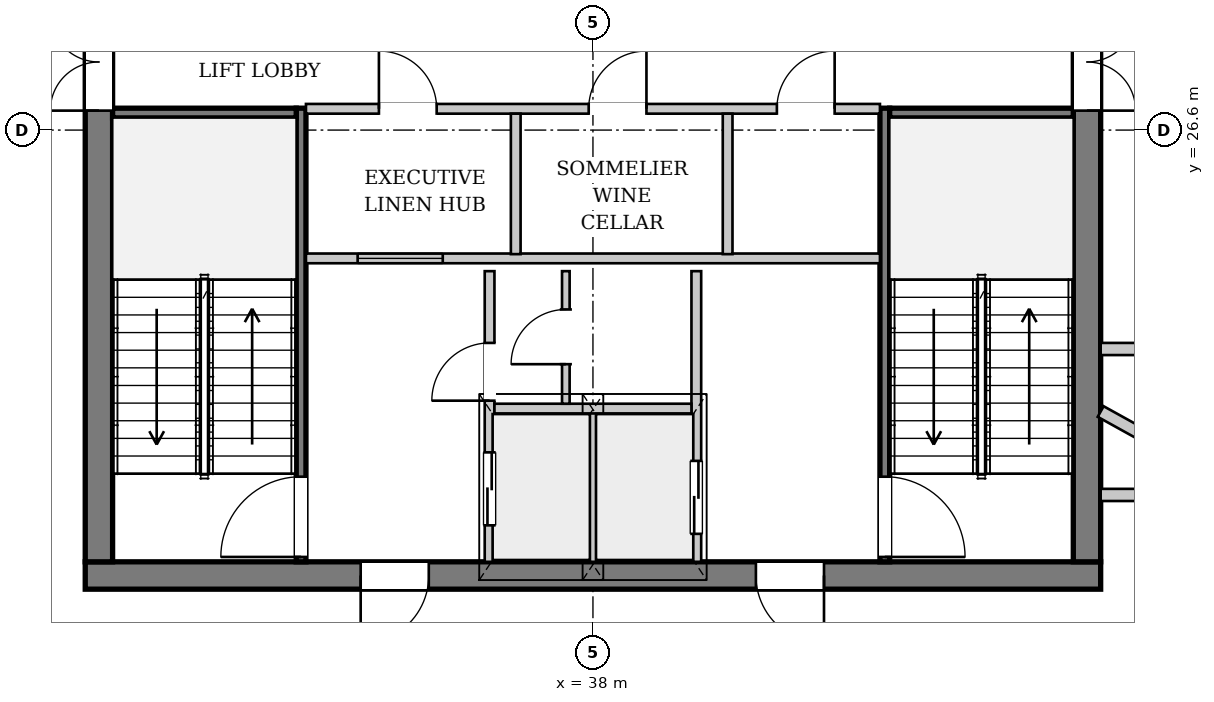
"""IFC4 building model, lengths in metres.
Left out: names, types, materials, properties, quantities, classifications, styles, units other than length and angle.
Written with IfcOpenShell. Run it as: python <this file> out.ifc"""

import sys

from ifc_helpers import new_model, si_unit, direction, frame, frame_2d, origin, place, context, subcontext, project, spatial, rectangle, extrude, source, transform, mapped, element, fill, save


model = new_model("IFC4")
c1 = context("Model", 3, precision=1e-05, world=origin(), true_north=direction((0.0, 1.0)))
c2 = subcontext(c1, "Body", "Model", "MODEL_VIEW")
j1 = project(units=[si_unit("LENGTHUNIT", "METRE"), si_unit("PLANEANGLEUNIT", "RADIAN")], contexts=[c1])
p1 = place(None, origin())
s1 = spatial("IfcSite", under=j1, at=p1, CompositionType="ELEMENT")
p2 = place(p1, origin())
s2 = spatial("IfcBuilding", under=s1, at=p2, CompositionType="ELEMENT")
p3 = place(p2, frame((0.0, 0.0, 281.9)))
s3 = spatial("IfcBuildingStorey", under=s2, at=p3, CompositionType="ELEMENT", Elevation=281.9)
p4 = place(p3, frame((30.342, 12.993, 0.0), z_axis=(0.0, 0.0, 1.0), x_axis=(-0.80942781076, 0.587219396111, 0.0)))
e1 = element("IfcWall", 1, at=p4, inside=s3, PredefinedType="SOLIDWALL", context=c2, shape_type="SweptSolid", body=[
    extrude(rectangle(XDim=17.172, YDim=0.32, at=frame_2d((8.586, 0.0))), origin(), (0.0, 0.0, 1.0), 3.462),
])
p5 = place(p4, frame((3.995, 0.0, 0.0)))
e2 = element("IfcOpeningElement", 2, at=p5, cuts=e1, PredefinedType="OPENING", context=c2, shape_type="SweptSolid", body=[
    extrude(rectangle(XDim=1.5, YDim=2.3, at=frame_2d((0.75, 1.15))), frame((0.0, 0.17, 0.0), z_axis=(0.0, -1.0, 0.0), x_axis=(1.0, 0.0, 0.0)), (0.0, 0.0, 1.0), 0.34),
])
p6 = place(p4, frame((11.407, 0.0, 0.65)))
e3 = element("IfcOpeningElement", 3, at=p6, cuts=e1, PredefinedType="OPENING", context=c2, shape_type="SweptSolid", body=[
    extrude(rectangle(XDim=2.6, YDim=2.35, at=frame_2d((1.3, 1.175))), frame((0.0, 0.17, 0.0), z_axis=(0.0, -1.0, 0.0), x_axis=(1.0, 0.0, 0.0)), (0.0, 0.0, 1.0), 0.34),
])
p7 = place(p3, frame((46.35, 19.275, 0.0), z_axis=(0.0, 0.0, 1.0), x_axis=(-1.0, 0.0, 0.0)))
e4 = element("IfcWall", 4, at=p7, inside=s3, PredefinedType="SHEAR", context=c2, shape_type="SweptSolid", body=[
    extrude(rectangle(XDim=16.7, YDim=0.45, at=frame_2d((8.35, 0.0))), origin(), (0.0, 0.0, 1.0), 3.92),
])
p8 = place(p7, frame((4.55, 0.0, 0.0)))
e5 = element("IfcOpeningElement", 5, at=p8, cuts=e4, PredefinedType="OPENING", context=c2, shape_type="SweptSolid", body=[
    extrude(rectangle(XDim=1.12, YDim=2.25, at=frame_2d((0.56, 1.125))), frame((0.0, 0.235, 0.0), z_axis=(0.0, -1.0, 0.0), x_axis=(1.0, 0.0, 0.0)), (0.0, 0.0, 1.0), 0.47),
])
p9 = place(p7, frame((11.05, 0.0, 0.0)))
e6 = element("IfcOpeningElement", 6, at=p9, cuts=e4, PredefinedType="OPENING", context=c2, shape_type="SweptSolid", body=[
    extrude(rectangle(XDim=1.12, YDim=2.25, at=frame_2d((0.56, 1.125))), frame((0.0, 0.235, 0.0), z_axis=(0.0, -1.0, 0.0), x_axis=(1.0, 0.0, 0.0)), (0.0, 0.0, 1.0), 0.47),
])
p10 = place(p3, frame((29.875, 19.5, 0.0), z_axis=(0.0, 0.0, 1.0), x_axis=(0.0, 1.0, 0.0)))
e7 = element("IfcWall", 7, at=p10, inside=s3, PredefinedType="SHEAR", context=c2, shape_type="SweptSolid", body=[
    extrude(rectangle(XDim=14.2, YDim=0.45, at=frame_2d((7.1, 0.0))), origin(), (0.0, 0.0, 1.0), 3.92),
])
p11 = place(p10, frame((7.42, 0.0, 0.0)))
e8 = element("IfcOpeningElement", 8, at=p11, cuts=e7, PredefinedType="OPENING", context=c2, shape_type="SweptSolid", body=[
    extrude(rectangle(XDim=1.6, YDim=2.2, at=frame_2d((0.8, 1.1))), frame((0.0, 0.235, 0.0), z_axis=(0.0, -1.0, 0.0), x_axis=(1.0, 0.0, 0.0)), (0.0, 0.0, 1.0), 0.47),
])
p12 = place(p3, frame((46.125, 33.7, 0.0), z_axis=(0.0, 0.0, 1.0), x_axis=(0.0, -1.0, 0.0)))
e9 = element("IfcWall", 9, at=p12, inside=s3, PredefinedType="SHEAR", context=c2, shape_type="SweptSolid", body=[
    extrude(rectangle(XDim=14.2, YDim=0.45, at=frame_2d((7.1, 0.0))), origin(), (0.0, 0.0, 1.0), 3.92),
])
p13 = place(p12, frame((5.18, 0.0, 0.0)))
e10 = element("IfcOpeningElement", 10, at=p13, cuts=e9, PredefinedType="OPENING", context=c2, shape_type="SweptSolid", body=[
    extrude(rectangle(XDim=1.6, YDim=2.2, at=frame_2d((0.8, 1.1))), frame((0.0, 0.235, 0.0), z_axis=(0.0, -1.0, 0.0), x_axis=(1.0, 0.0, 0.0)), (0.0, 0.0, 1.0), 0.47),
])
p14 = place(p12, frame((2.05, 0.0, 0.0)))
e11 = element("IfcOpeningElement", 11, at=p14, cuts=e9, PredefinedType="OPENING", context=c2, shape_type="SweptSolid", body=[
    extrude(rectangle(XDim=0.95, YDim=2.1, at=frame_2d((0.475, 1.05))), frame((0.0, 0.235, 0.0), z_axis=(0.0, -1.0, 0.0), x_axis=(1.0, 0.0, 0.0)), (0.0, 0.0, 1.0), 0.47),
])
p15 = place(p3, frame((33.2, 19.5, 0.0), z_axis=(0.0, 0.0, 1.0), x_axis=(0.0, 1.0, 0.0)))
e12 = element("IfcWall", 12, at=p15, inside=s3, PredefinedType="PARTITIONING", context=c2, shape_type="SweptSolid", body=[
    extrude(rectangle(XDim=7.46, YDim=0.16, at=frame_2d((3.73, 0.0))), origin(), (0.0, 0.0, 1.0), 3.92),
])
p16 = place(p15, frame((0.08, 0.0, 0.0)))
e13 = element("IfcOpeningElement", 13, at=p16, cuts=e12, PredefinedType="OPENING", context=c2, shape_type="SweptSolid", body=[
    extrude(rectangle(XDim=1.32, YDim=2.2, at=frame_2d((0.66, 1.1))), frame((0.0, 0.09, 0.0), z_axis=(0.0, -1.0, 0.0), x_axis=(1.0, 0.0, 0.0)), (0.0, 0.0, 1.0), 0.18),
])
p17 = place(p3, frame((30.1, 26.88, 0.0), z_axis=(0.0, 0.0, 1.0), x_axis=(1.0, 0.0, 0.0)))
e14 = element("IfcWall", 14, at=p17, inside=s3, PredefinedType="PARTITIONING", context=c2, shape_type="SweptSolid", body=[
    extrude(rectangle(XDim=3.02, YDim=0.16, at=frame_2d((1.51, 0.0))), origin(), (0.0, 0.0, 1.0), 3.92),
])
p18 = place(p3, frame((42.8, 26.96, 0.0), z_axis=(0.0, 0.0, 1.0), x_axis=(0.0, -1.0, 0.0)))
e15 = element("IfcWall", 15, at=p18, inside=s3, PredefinedType="PARTITIONING", context=c2, shape_type="SweptSolid", body=[
    extrude(rectangle(XDim=7.46, YDim=0.16, at=frame_2d((3.73, 0.0))), origin(), (0.0, 0.0, 1.0), 3.92),
])
p19 = place(p18, frame((6.06, 0.0, 0.0)))
e16 = element("IfcOpeningElement", 16, at=p19, cuts=e15, PredefinedType="OPENING", context=c2, shape_type="SweptSolid", body=[
    extrude(rectangle(XDim=1.32, YDim=2.2, at=frame_2d((0.66, 1.1))), frame((0.0, 0.09, 0.0), z_axis=(0.0, -1.0, 0.0), x_axis=(1.0, 0.0, 0.0)), (0.0, 0.0, 1.0), 0.18),
])
p20 = place(p3, frame((42.88, 26.88, 0.0), z_axis=(0.0, 0.0, 1.0), x_axis=(1.0, 0.0, 0.0)))
e17 = element("IfcWall", 17, at=p20, inside=s3, PredefinedType="PARTITIONING", context=c2, shape_type="SweptSolid", body=[
    extrude(rectangle(XDim=3.02, YDim=0.16, at=frame_2d((1.51, 0.0))), origin(), (0.0, 0.0, 1.0), 3.92),
])
p21 = place(p3, frame((36.3, 19.5, 0.0), z_axis=(0.0, 0.0, 1.0), x_axis=(0.0, 1.0, 0.0)))
e18 = element("IfcWall", 18, at=p21, inside=s3, PredefinedType="PARTITIONING", context=c2, shape_type="SweptSolid", body=[
    extrude(rectangle(XDim=4.78, YDim=0.16, at=frame_2d((2.39, 0.0))), origin(), (0.0, 0.0, 1.0), 3.92),
])
p22 = place(p21, frame((0.6, 0.0, 0.0)))
e19 = element("IfcOpeningElement", 19, at=p22, cuts=e18, PredefinedType="OPENING", context=c2, shape_type="SweptSolid", body=[
    extrude(rectangle(XDim=1.2, YDim=2.2, at=frame_2d((0.6, 1.1))), frame((0.0, 0.09, 0.0), z_axis=(0.0, -1.0, 0.0), x_axis=(1.0, 0.0, 0.0)), (0.0, 0.0, 1.0), 0.18),
])
p23 = place(p21, frame((2.65, 0.0, 0.0)))
e20 = element("IfcOpeningElement", 20, at=p23, cuts=e18, PredefinedType="OPENING", context=c2, shape_type="SweptSolid", body=[
    extrude(rectangle(XDim=0.95, YDim=2.1, at=frame_2d((0.475, 1.05))), frame((0.0, 0.09, 0.0), z_axis=(0.0, -1.0, 0.0), x_axis=(1.0, 0.0, 0.0)), (0.0, 0.0, 1.0), 0.18),
])
p24 = place(p3, frame((39.7, 24.28, 0.0), z_axis=(0.0, 0.0, 1.0), x_axis=(0.0, -1.0, 0.0)))
e21 = element("IfcWall", 21, at=p24, inside=s3, PredefinedType="PARTITIONING", context=c2, shape_type="SweptSolid", body=[
    extrude(rectangle(XDim=4.78, YDim=0.16, at=frame_2d((2.39, 0.0))), origin(), (0.0, 0.0, 1.0), 3.92),
])
p25 = place(p24, frame((3.12, 0.0, 0.0)))
e22 = element("IfcOpeningElement", 22, at=p25, cuts=e21, PredefinedType="OPENING", context=c2, shape_type="SweptSolid", body=[
    extrude(rectangle(XDim=1.2, YDim=2.2, at=frame_2d((0.6, 1.1))), frame((0.0, 0.09, 0.0), z_axis=(0.0, -1.0, 0.0), x_axis=(1.0, 0.0, 0.0)), (0.0, 0.0, 1.0), 0.18),
])
p26 = place(p3, frame((38.0, 19.5, 0.0), z_axis=(0.0, 0.0, 1.0), x_axis=(0.0, 1.0, 0.0)))
e23 = element("IfcWall", 23, at=p26, inside=s3, PredefinedType="PARTITIONING", context=c2, shape_type="SweptSolid", body=[
    extrude(rectangle(XDim=2.46, YDim=0.125, at=frame_2d((1.23, 0.0))), origin(), (0.0, 0.0, 1.0), 3.92),
])
p27 = place(p3, frame((36.38, 22.02, 0.0), z_axis=(0.0, 0.0, 1.0), x_axis=(1.0, 0.0, 0.0)))
e24 = element("IfcWall", 24, at=p27, inside=s3, PredefinedType="PARTITIONING", context=c2, shape_type="SweptSolid", body=[
    extrude(rectangle(XDim=3.24, YDim=0.16, at=frame_2d((1.62, 0.0))), origin(), (0.0, 0.0, 1.0), 3.92),
])
p28 = place(p3, frame((33.28, 24.49, 0.0), z_axis=(0.0, 0.0, 1.0), x_axis=(1.0, 0.0, 0.0)))
e25 = element("IfcWall", 25, at=p28, inside=s3, PredefinedType="PARTITIONING", context=c2, shape_type="SweptSolid", body=[
    extrude(rectangle(XDim=9.44, YDim=0.16, at=frame_2d((4.72, 0.0))), origin(), (0.0, 0.0, 1.0), 3.92),
])
p29 = place(p28, frame((0.85, 0.0, 0.95)))
e26 = element("IfcOpeningElement", 26, at=p29, cuts=e25, PredefinedType="OPENING", context=c2, shape_type="SweptSolid", body=[
    extrude(rectangle(XDim=1.4, YDim=1.8, at=frame_2d((0.7, 0.9))), frame((0.0, 0.09, 0.0), z_axis=(0.0, -1.0, 0.0), x_axis=(1.0, 0.0, 0.0)), (0.0, 0.0, 1.0), 0.18),
])
p30 = place(p3, frame((37.554, 22.1, 0.0), z_axis=(0.0, 0.0, 1.0), x_axis=(0.0, 1.0, 0.0)))
e27 = element("IfcWall", 27, at=p30, inside=s3, PredefinedType="PARTITIONING", context=c2, shape_type="SweptSolid", body=[
    extrude(rectangle(XDim=2.18, YDim=0.125, at=frame_2d((1.09, 0.0))), origin(), (0.0, 0.0, 1.0), 3.92),
])
p31 = place(p30, frame((0.65, 0.0, 0.0)))
e28 = element("IfcOpeningElement", 28, at=p31, cuts=e27, PredefinedType="OPENING", context=c2, shape_type="SweptSolid", body=[
    extrude(rectangle(XDim=0.9, YDim=2.1, at=frame_2d((0.45, 1.05))), frame((0.0, 0.073, 0.0), z_axis=(0.0, -1.0, 0.0), x_axis=(1.0, 0.0, 0.0)), (0.0, 0.0, 1.0), 0.145),
])
p32 = place(p3, frame((33.28, 26.95, 0.0), z_axis=(0.0, 0.0, 1.0), x_axis=(1.0, 0.0, 0.0)))
e29 = element("IfcWall", 29, at=p32, inside=s3, PredefinedType="PARTITIONING", context=c2, shape_type="SweptSolid", body=[
    extrude(rectangle(XDim=9.44, YDim=0.16, at=frame_2d((4.72, 0.0))), origin(), (0.0, 0.0, 1.0), 3.92),
])
p33 = place(p32, frame((1.2, 0.0, 0.0)))
e30 = element("IfcOpeningElement", 30, at=p33, cuts=e29, PredefinedType="OPENING", context=c2, shape_type="SweptSolid", body=[
    extrude(rectangle(XDim=0.95, YDim=2.1, at=frame_2d((0.475, 1.05))), frame((0.0, 0.09, 0.0), z_axis=(0.0, -1.0, 0.0), x_axis=(1.0, 0.0, 0.0)), (0.0, 0.0, 1.0), 0.18),
])
p34 = place(p32, frame((4.65, 0.0, 0.0)))
e31 = element("IfcOpeningElement", 31, at=p34, cuts=e29, PredefinedType="OPENING", context=c2, shape_type="SweptSolid", body=[
    extrude(rectangle(XDim=0.95, YDim=2.1, at=frame_2d((0.475, 1.05))), frame((0.0, 0.09, 0.0), z_axis=(0.0, -1.0, 0.0), x_axis=(1.0, 0.0, 0.0)), (0.0, 0.0, 1.0), 0.18),
])
p35 = place(p32, frame((7.745, 0.0, 0.0)))
e32 = element("IfcOpeningElement", 32, at=p35, cuts=e29, PredefinedType="OPENING", context=c2, shape_type="SweptSolid", body=[
    extrude(rectangle(XDim=0.95, YDim=2.1, at=frame_2d((0.475, 1.05))), frame((0.0, 0.09, 0.0), z_axis=(0.0, -1.0, 0.0), x_axis=(1.0, 0.0, 0.0)), (0.0, 0.0, 1.0), 0.18),
])
for number, where, z_axis, x_axis in (
    (33, (36.73, 24.56, 0.0), (0.0, 0.0, 1.0), (0.0, 1.0, 0.0)),
    (34, (40.215, 24.56, 0.0), (0.0, 0.0, 1.0), (0.0, 1.0, 0.0)),
):
    element("IfcWall", number, at=place(p3, frame(where, z_axis=z_axis, x_axis=x_axis)), inside=s3, PredefinedType="PARTITIONING", context=c2, shape_type="SweptSolid", body=[
        extrude(rectangle(XDim=2.31, YDim=0.16, at=frame_2d((1.155, 0.0))), origin(), (0.0, 0.0, 1.0), 3.92),
    ])
p36 = place(p3, frame((46.35, 21.971, 0.0), z_axis=(0.0, 0.0, 1.0), x_axis=(0.874624795307, -0.484800440835, 0.0)))
e35 = element("IfcWall", 35, at=p36, inside=s3, PredefinedType="PARTITIONING", context=c2, shape_type="SweptSolid", body=[
    extrude(rectangle(XDim=3.815, YDim=0.2, at=frame_2d((1.907, 0.0))), origin(), (0.0, 0.0, 1.0), 3.92),
])
for number, where, z_axis, x_axis in (
    (36, (46.35, 20.6, 0.0), (0.0, 0.0, 1.0), (1.0, 0.0, 0.0)),
    (37, (46.35, 23.0, 0.0), (0.0, 0.0, 1.0), (1.0, 0.0, 0.0)),
):
    element("IfcWall", number, at=place(p3, frame(where, z_axis=z_axis, x_axis=x_axis)), inside=s3, PredefinedType="PARTITIONING", context=c2, shape_type="SweptSolid", body=[
        extrude(rectangle(XDim=1.85, YDim=0.2, at=frame_2d((0.925, 0.0))), origin(), (0.0, 0.0, 1.0), 3.92),
    ])
m1 = source(origin(), c2, "Body", "SweptSolid", [
    extrude(rectangle(XDim=1.12, YDim=2.25, at=frame_2d((0.56, 1.125))), frame((0.0, 0.025, 0.0), z_axis=(0.0, -1.0, 0.0), x_axis=(1.0, 0.0, 0.0)), (0.0, 0.0, 1.0), 0.05),
])
p37 = place(p8, origin())
e38 = element("IfcDoor", 38, at=p37, inside=s3, OperationType="SINGLE_SWING_LEFT", PredefinedType="DOOR", context=c2, shape_type="MappedRepresentation", body=[
    mapped(m1, transform((0.0, 0.0, 0.0), x_axis=(1.0, 0.0, 0.0), y_axis=(0.0, 1.0, 0.0), z_axis=(0.0, 0.0, 1.0), scale=1.0)),
])
fill(e5, e38)
p38 = place(p9, origin())
e39 = element("IfcDoor", 39, at=p38, inside=s3, OperationType="SINGLE_SWING_RIGHT", PredefinedType="DOOR", context=c2, shape_type="MappedRepresentation", body=[
    mapped(m1, transform((0.0, 0.0, 0.0), x_axis=(1.0, 0.0, 0.0), y_axis=(0.0, 1.0, 0.0), z_axis=(0.0, 0.0, 1.0), scale=1.0)),
])
fill(e6, e39)
m2 = source(origin(), c2, "Body", "SweptSolid", [
    extrude(rectangle(XDim=1.6, YDim=2.2, at=frame_2d((0.8, 1.1))), frame((0.0, 0.025, 0.0), z_axis=(0.0, -1.0, 0.0), x_axis=(1.0, 0.0, 0.0)), (0.0, 0.0, 1.0), 0.05),
])
p39 = place(p11, origin())
e40 = element("IfcDoor", 40, at=p39, inside=s3, OperationType="DOUBLE_DOOR_SINGLE_SWING", PredefinedType="DOOR", context=c2, shape_type="MappedRepresentation", body=[
    mapped(m2, transform((0.0, 0.0, 0.0), x_axis=(1.0, 0.0, 0.0), y_axis=(0.0, 1.0, 0.0), z_axis=(0.0, 0.0, 1.0), scale=1.0)),
])
fill(e8, e40)
p40 = place(p13, origin())
e41 = element("IfcDoor", 41, at=p40, inside=s3, OperationType="DOUBLE_DOOR_SINGLE_SWING", PredefinedType="DOOR", context=c2, shape_type="MappedRepresentation", body=[
    mapped(m2, transform((0.0, 0.0, 0.0), x_axis=(1.0, 0.0, 0.0), y_axis=(0.0, 1.0, 0.0), z_axis=(0.0, 0.0, 1.0), scale=1.0)),
])
fill(e10, e41)
m3 = source(origin(), c2, "Body", "SweptSolid", [
    extrude(rectangle(XDim=1.32, YDim=2.2, at=frame_2d((0.66, 1.1))), frame((0.0, 0.025, 0.0), z_axis=(0.0, -1.0, 0.0), x_axis=(1.0, 0.0, 0.0)), (0.0, 0.0, 1.0), 0.05),
])
p41 = place(p16, origin())
e42 = element("IfcDoor", 42, at=p41, inside=s3, OperationType="SINGLE_SWING_LEFT", PredefinedType="DOOR", context=c2, shape_type="MappedRepresentation", body=[
    mapped(m3, transform((0.0, 0.0, 0.0), x_axis=(1.0, 0.0, 0.0), y_axis=(0.0, 1.0, 0.0), z_axis=(0.0, 0.0, 1.0), scale=1.0)),
])
fill(e13, e42)
p42 = place(p19, origin())
e43 = element("IfcDoor", 43, at=p42, inside=s3, OperationType="SINGLE_SWING_RIGHT", PredefinedType="DOOR", context=c2, shape_type="MappedRepresentation", body=[
    mapped(m3, transform((0.0, 0.0, 0.0), x_axis=(1.0, 0.0, 0.0), y_axis=(0.0, 1.0, 0.0), z_axis=(0.0, 0.0, 1.0), scale=1.0)),
])
fill(e16, e43)
m4 = source(origin(), c2, "Body", "SweptSolid", [
    extrude(rectangle(XDim=1.2, YDim=2.2, at=frame_2d((0.6, 1.1))), frame((0.0, 0.025, 0.0), z_axis=(0.0, -1.0, 0.0), x_axis=(1.0, 0.0, 0.0)), (0.0, 0.0, 1.0), 0.05),
])
p43 = place(p22, origin())
e44 = element("IfcDoor", 44, at=p43, inside=s3, OperationType="DOUBLE_DOOR_SLIDING", PredefinedType="DOOR", context=c2, shape_type="MappedRepresentation", body=[
    mapped(m4, transform((0.0, 0.0, 0.0), x_axis=(1.0, 0.0, 0.0), y_axis=(0.0, 1.0, 0.0), z_axis=(0.0, 0.0, 1.0), scale=1.0)),
])
fill(e19, e44)
m5 = source(origin(), c2, "Body", "SweptSolid", [
    extrude(rectangle(XDim=0.95, YDim=2.1, at=frame_2d((0.475, 1.05))), frame((0.0, 0.025, 0.0), z_axis=(0.0, -1.0, 0.0), x_axis=(1.0, 0.0, 0.0)), (0.0, 0.0, 1.0), 0.05),
])
p44 = place(p23, origin())
e45 = element("IfcDoor", 45, at=p44, inside=s3, OperationType="SINGLE_SWING_LEFT", PredefinedType="DOOR", context=c2, shape_type="MappedRepresentation", body=[
    mapped(m5, transform((0.0, 0.0, 0.0), x_axis=(1.0, 0.0, 0.0), y_axis=(0.0, 1.0, 0.0), z_axis=(0.0, 0.0, 1.0), scale=1.0)),
])
fill(e20, e45)
m6 = source(origin(), c2, "Body", "SweptSolid", [
    extrude(rectangle(XDim=0.9, YDim=2.1, at=frame_2d((0.45, 1.05))), frame((0.0, 0.025, 0.0), z_axis=(0.0, -1.0, 0.0), x_axis=(1.0, 0.0, 0.0)), (0.0, 0.0, 1.0), 0.05),
])
p45 = place(p31, origin())
e46 = element("IfcDoor", 46, at=p45, inside=s3, OperationType="SINGLE_SWING_LEFT", PredefinedType="DOOR", context=c2, shape_type="MappedRepresentation", body=[
    mapped(m6, transform((0.0, 0.0, 0.0), x_axis=(1.0, 0.0, 0.0), y_axis=(0.0, 1.0, 0.0), z_axis=(0.0, 0.0, 1.0), scale=1.0)),
])
fill(e28, e46)
p46 = place(p25, origin())
e47 = element("IfcDoor", 47, at=p46, inside=s3, OperationType="DOUBLE_DOOR_SLIDING", PredefinedType="DOOR", context=c2, shape_type="MappedRepresentation", body=[
    mapped(m4, transform((0.0, 0.0, 0.0), x_axis=(1.0, 0.0, 0.0), y_axis=(0.0, 1.0, 0.0), z_axis=(0.0, 0.0, 1.0), scale=1.0)),
])
fill(e22, e47)
p47 = place(p33, origin())
e48 = element("IfcDoor", 48, at=p47, inside=s3, OperationType="SINGLE_SWING_LEFT", PredefinedType="DOOR", context=c2, shape_type="MappedRepresentation", body=[
    mapped(m5, transform((0.0, 0.0, 0.0), x_axis=(1.0, 0.0, 0.0), y_axis=(0.0, 1.0, 0.0), z_axis=(0.0, 0.0, 1.0), scale=1.0)),
])
fill(e30, e48)
p48 = place(p34, origin())
e49 = element("IfcDoor", 49, at=p48, inside=s3, OperationType="SINGLE_SWING_RIGHT", PredefinedType="DOOR", context=c2, shape_type="MappedRepresentation", body=[
    mapped(m5, transform((0.0, 0.0, 0.0), x_axis=(1.0, 0.0, 0.0), y_axis=(0.0, 1.0, 0.0), z_axis=(0.0, 0.0, 1.0), scale=1.0)),
])
fill(e31, e49)
p49 = place(p35, origin())
e50 = element("IfcDoor", 50, at=p49, inside=s3, OperationType="SINGLE_SWING_RIGHT", PredefinedType="DOOR", context=c2, shape_type="MappedRepresentation", body=[
    mapped(m5, transform((0.0, 0.0, 0.0), x_axis=(1.0, 0.0, 0.0), y_axis=(0.0, 1.0, 0.0), z_axis=(0.0, 0.0, 1.0), scale=1.0)),
])
fill(e32, e50)
m7 = source(origin(), c2, "Body", "SweptSolid", [
    extrude(rectangle(XDim=1.4, YDim=1.8, at=frame_2d((0.7, 0.9))), frame((0.0, 0.03, 0.0), z_axis=(0.0, -1.0, 0.0), x_axis=(1.0, 0.0, 0.0)), (0.0, 0.0, 1.0), 0.06),
])
p50 = place(p29, origin())
e51 = element("IfcWindow", 51, at=p50, inside=s3, PartitioningType="SINGLE_PANEL", PredefinedType="WINDOW", context=c2, shape_type="MappedRepresentation", body=[
    mapped(m7, transform((0.0, 0.0, 0.0), x_axis=(1.0, 0.0, 0.0), y_axis=(0.0, 1.0, 0.0), z_axis=(0.0, 0.0, 1.0), scale=1.0)),
])
fill(e26, e51)
save(model, sys.argv[1])
